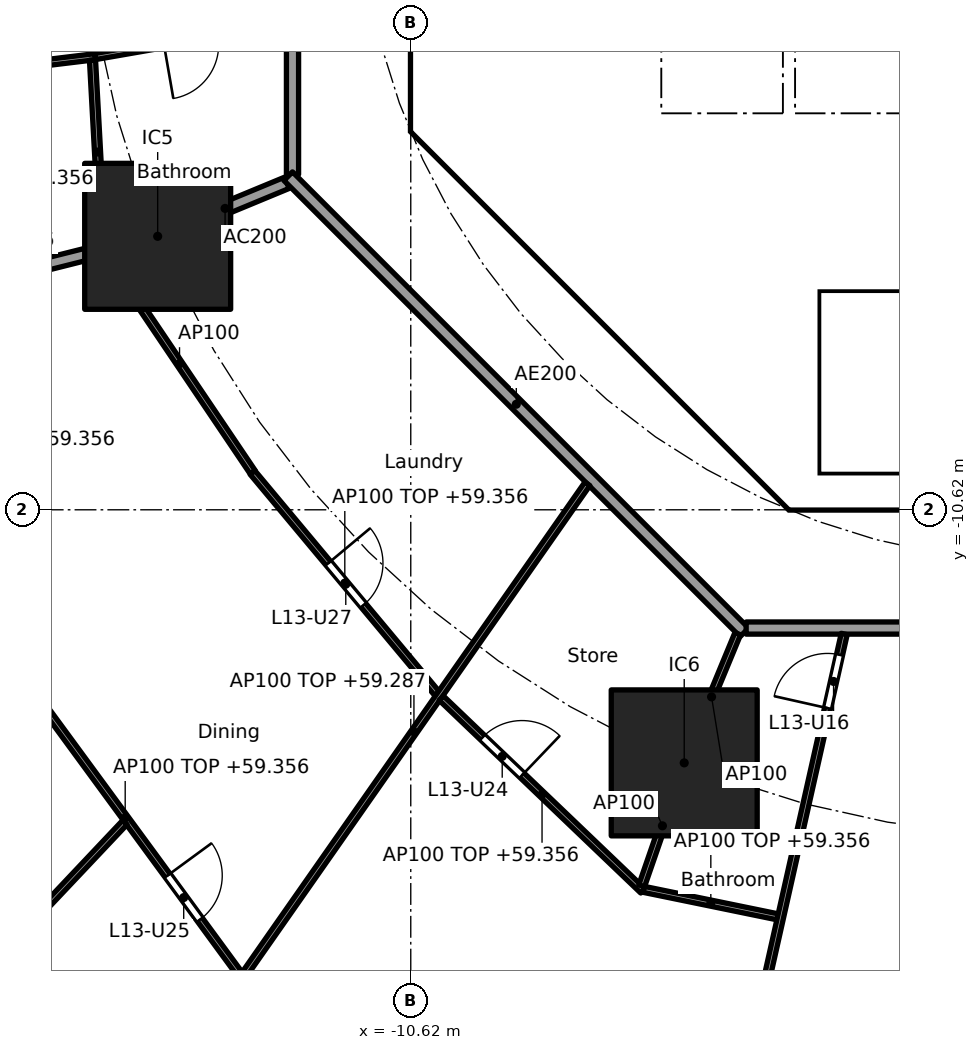
"""IFC4 building model, lengths in metres.
Left out: names, types, materials, properties, quantities, classifications, styles, units other than length and angle.
Written with IfcOpenShell. Run it as: python <this file> out.ifc"""

import sys

from ifc_helpers import new_model, si_unit, direction, frame, frame_2d, origin, origin_2d, place, context, subcontext, project, spatial, polyline, rectangle, outline, extrude, element, fill, save


model = new_model("IFC4")
c1 = context("Model", 3, precision=1e-05, world=origin(), true_north=direction((0.0, 1.0)))
c2 = subcontext(c1, "Body", "Model", "MODEL_VIEW")
j1 = project(units=[si_unit("LENGTHUNIT", "METRE"), si_unit("PLANEANGLEUNIT", "RADIAN")], contexts=[c1])
p1 = place(None, origin())
s1 = spatial("IfcSite", under=j1, at=p1, CompositionType="ELEMENT")
p2 = place(p1, origin())
s2 = spatial("IfcBuilding", under=s1, at=p2, CompositionType="ELEMENT")
p3 = place(p2, frame((0.0, 0.0, 56.6)))
s3 = spatial("IfcBuildingStorey", under=s2, at=p3, CompositionType="ELEMENT", Elevation=56.6)
for number, where, z_axis, x_axis in (
    (1, (-14.782, -6.123, 0.0), (0.0, 0.0, 1.0), (1.0, 0.0, 0.0)),
    (2, (-6.123, -14.782, 0.0), (0.0, 0.0, 1.0), (1.0, 0.0, 0.0)),
):
    element("IfcColumn", number, at=place(p3, frame(where, z_axis=z_axis, x_axis=x_axis)), inside=s3, PredefinedType="COLUMN", context=c2, shape_type="SweptSolid", body=[
        extrude(rectangle(XDim=2.4, YDim=2.4, at=origin_2d()), origin(), (0.0, 0.0, 1.0), 3.7),
    ])
p4 = place(p3, frame((-10.325, 3.801, 0.0), z_axis=(0.0, 0.0, 1.0), x_axis=(0.0, -1.0, 0.0)))
e3 = element("IfcWall", 3, at=p4, inside=s3, PredefinedType="SHEAR", context=c2, shape_type="SweptSolid", body=[
    extrude(rectangle(XDim=7.602, YDim=0.6, at=frame_2d((3.801, 0.0))), origin(), (0.0, 0.0, 1.0), 3.44),
])
p5 = place(p4, frame((0.651, 0.0, 0.0)))
e4 = element("IfcOpeningElement", 4, at=p5, cuts=e3, PredefinedType="OPENING", context=c2, shape_type="SweptSolid", body=[
    extrude(rectangle(XDim=1.5, YDim=2.1, at=frame_2d((0.75, 1.05))), frame((0.0, 0.31, 0.0), z_axis=(0.0, -1.0, 0.0), x_axis=(1.0, 0.0, 0.0)), (0.0, 0.0, 1.0), 0.62),
])
p6 = place(p4, frame((5.451, 0.0, 0.0)))
e5 = element("IfcOpeningElement", 5, at=p6, cuts=e3, PredefinedType="OPENING", context=c2, shape_type="SweptSolid", body=[
    extrude(rectangle(XDim=1.5, YDim=2.1, at=frame_2d((0.75, 1.05))), frame((0.0, 0.31, 0.0), z_axis=(0.0, -1.0, 0.0), x_axis=(1.0, 0.0, 0.0)), (0.0, 0.0, 1.0), 0.62),
])
p7 = place(p3, frame((-9.988, -4.613, 0.0), z_axis=(0.0, 0.0, 1.0), x_axis=(0.707106781187, -0.707106781187, 0.0)))
e6 = element("IfcWall", 6, at=p7, inside=s3, PredefinedType="SHEAR", context=c2, shape_type="SweptSolid", body=[
    extrude(rectangle(XDim=7.602, YDim=0.6, at=frame_2d((3.801, 0.0))), origin(), (0.0, 0.0, 1.0), 3.44),
])
p8 = place(p7, frame((6.151, 0.0, 0.0)))
e7 = element("IfcOpeningElement", 7, at=p8, cuts=e6, PredefinedType="OPENING", context=c2, shape_type="SweptSolid", body=[
    extrude(rectangle(XDim=1.1, YDim=2.1, at=frame_2d((0.55, 1.05))), frame((0.0, 0.31, 0.0), z_axis=(0.0, -1.0, 0.0), x_axis=(1.0, 0.0, 0.0)), (0.0, 0.0, 1.0), 0.62),
])
p9 = place(p3, frame((-7.4, -6.627, 0.0), z_axis=(0.0, 0.0, 1.0), x_axis=(0.0, 1.0, 0.0)))
e8 = element("IfcWall", 8, at=p9, inside=s3, PredefinedType="PARTITIONING", context=c2, shape_type="SweptSolid", body=[
    extrude(rectangle(XDim=2.527, YDim=0.15, at=frame_2d((1.263, 0.0))), origin(), (0.0, 0.0, 1.0), 3.44),
])
p10 = place(p9, frame((0.776, 0.0, 0.0)))
e9 = element("IfcOpeningElement", 9, at=p10, cuts=e8, PredefinedType="OPENING", context=c2, shape_type="SweptSolid", body=[
    extrude(rectangle(XDim=0.9, YDim=2.1, at=frame_2d((0.45, 1.05))), frame((0.0, 0.085, 0.0), z_axis=(0.0, -1.0, 0.0), x_axis=(1.0, 0.0, 0.0)), (0.0, 0.0, 1.0), 0.17),
])
p11 = place(p3, frame((-4.0, -6.5, 0.0), z_axis=(0.0, 0.0, 1.0), x_axis=(0.0, 1.0, 0.0)))
e10 = element("IfcWall", 10, at=p11, inside=s3, PredefinedType="SOLIDWALL", context=c2, shape_type="SweptSolid", body=[
    extrude(rectangle(XDim=2.2, YDim=0.2, at=frame_2d((1.1, 0.0))), origin(), (0.0, 0.0, 1.0), 3.44),
])
p12 = place(p11, frame((0.65, 0.0, 0.0)))
e11 = element("IfcOpeningElement", 11, at=p12, cuts=e10, PredefinedType="OPENING", context=c2, shape_type="SweptSolid", body=[
    extrude(rectangle(XDim=0.9, YDim=2.1, at=frame_2d((0.45, 1.05))), frame((0.0, 0.11, 0.0), z_axis=(0.0, -1.0, 0.0), x_axis=(1.0, 0.0, 0.0)), (0.0, 0.0, 1.0), 0.22),
])
p13 = place(p3, origin())
e12 = element("IfcWall", 12, at=p13, inside=s3, PredefinedType="SHEAR", context=c2, shape_type="SweptSolid", body=[
    extrude(outline(polyline([(-10.625, -3.801), (-10.025, -3.801), (-10.025, -4.152), (-9.776, -4.401), (-10.2, -4.825), (-10.625, -4.401), (-10.625, -3.801)])), origin(), (0.0, 0.0, 1.0), 3.44),
])
p14 = place(p3, origin())
e13 = element("IfcWall", 13, at=p14, inside=s3, PredefinedType="SHEAR", context=c2, shape_type="SweptSolid", body=[
    extrude(outline(polyline([(-4.152, -10.025), (4.152, -10.025), (4.401, -9.776), (4.825, -10.2), (4.401, -10.625), (-4.401, -10.625), (-4.825, -10.2), (-4.401, -9.776), (-4.152, -10.025)])), origin(), (0.0, 0.0, 1.0), 3.44),
])
p15 = place(p3, frame((-10.025, -4.0, 0.0), z_axis=(0.0, 0.0, 1.0), x_axis=(1.0, 0.0, 0.0)))
e14 = element("IfcWall", 14, at=p15, inside=s3, PredefinedType="PARTITIONING", context=c2, shape_type="SweptSolid", body=[
    extrude(rectangle(XDim=3.325, YDim=0.2, at=frame_2d((1.662, 0.0))), origin(), (0.0, 0.0, 1.0), 3.44),
])
p16 = place(p3, origin())
e15 = element("IfcWall", 15, at=p16, inside=s3, PredefinedType="SOLIDWALL", context=c2, shape_type="SweptSolid", body=[
    extrude(outline(polyline([(-6.7, -2.1), (-6.5, -2.1), (-6.5, -4.1), (-4.5, -4.1), (-4.5, -2.1), (-4.3, -2.1), (-4.3, -4.1), (-2.3, -4.1), (-2.3, -2.1), (-2.1, -2.1), (-2.1, -4.1), (-0.1, -4.1), (-0.1, -2.1), (0.1, -2.1), (0.1, -4.1), (2.1, -4.1), (2.1, -2.1), (2.3, -2.1), (2.3, -4.1), (4.3, -4.1), (4.3, -2.1), (4.5, -2.1), (4.5, -4.1), (6.5, -4.1), (6.5, -2.1), (6.7, -2.1), (6.7, -4.3), (-6.7, -4.3), (-6.7, -2.1)])), origin(), (0.0, 0.0, 1.0), 3.44),
])
p17 = place(p3, origin())
e16 = element("IfcWall", 16, at=p17, inside=s3, PredefinedType="SOLIDWALL", context=c2, shape_type="SweptSolid", body=[
    extrude(outline(polyline([(-3.9, -10.025), (-4.1, -10.025), (-4.1, -7.025), (-3.9, -7.025), (-3.9, -10.025)])), origin(), (0.0, 0.0, 1.0), 3.44),
])
p18 = place(p3, origin())
e17 = element("IfcWall", 17, at=p18, inside=s3, PredefinedType="SOLIDWALL", context=c2, shape_type="SweptSolid", body=[
    extrude(outline(polyline([(4.1, -7.025), (-4.1, -7.025), (-4.1, -6.5), (4.1, -6.5), (4.1, -7.025)])), origin(), (0.0, 0.0, 1.0), 3.44),
])
p19 = place(p3, frame((-12.657, -5.243, 0.0), z_axis=(0.0, 0.0, 1.0), x_axis=(-0.923885664896, -0.382668627144, 0.0)))
e18 = element("IfcWall", 18, at=p19, inside=s3, PredefinedType="PARTITIONING", context=c2, shape_type="SweptSolid", body=[
    extrude(rectangle(XDim=2.2, YDim=0.2, at=frame_2d((1.1, 0.0))), origin(), (0.0, 0.0, 1.0), 3.44),
])
p20 = place(p3, frame((-14.831, -6.135, 0.0), z_axis=(0.0, 0.0, 1.0), x_axis=(-0.969884949569, -0.243563512454, 0.0)))
e19 = element("IfcWall", 19, at=p20, inside=s3, PredefinedType="PARTITIONING", context=c2, shape_type="SweptSolid", body=[
    extrude(rectangle(XDim=8.829, YDim=0.2, at=frame_2d((4.415, 0.0))), origin(), (0.0, 0.0, 1.0), 2.756),
])
p21 = place(p3, frame((-12.565, 5.304, 0.0), z_axis=(0.0, 0.0, 1.0), x_axis=(0.0, -1.0, 0.0)))
e20 = element("IfcWall", 20, at=p21, inside=s3, PredefinedType="PARTITIONING", context=c2, shape_type="SweptSolid", body=[
    extrude(rectangle(XDim=10.409, YDim=0.2, at=frame_2d((5.205, 0.0))), origin(), (0.0, 0.0, 1.0), 3.44),
])
p22 = place(p21, frame((6.106, 0.0, 0.0)))
e21 = element("IfcOpeningElement", 21, at=p22, cuts=e20, PredefinedType="OPENING", context=c2, shape_type="SweptSolid", body=[
    extrude(rectangle(XDim=1.0, YDim=2.1, at=frame_2d((0.5, 1.05))), frame((0.0, 0.11, 0.0), z_axis=(0.0, -1.0, 0.0), x_axis=(1.0, 0.0, 0.0)), (0.0, 0.0, 1.0), 0.22),
])
p23 = place(p3, frame((-12.635, -5.134, 0.0), z_axis=(0.0, 0.0, 1.0), x_axis=(0.707106781187, -0.707106781187, 0.0)))
e22 = element("IfcWall", 22, at=p23, inside=s3, PredefinedType="PARTITIONING", context=c2, shape_type="SweptSolid", body=[
    extrude(rectangle(XDim=10.609, YDim=0.2, at=frame_2d((5.305, 0.0))), origin(), (0.0, 0.0, 1.0), 3.44),
])
p24 = place(p3, frame((-5.104, -12.565, 0.0), z_axis=(0.0, 0.0, 1.0), x_axis=(1.0, 0.0, 0.0)))
e23 = element("IfcWall", 23, at=p24, inside=s3, PredefinedType="PARTITIONING", context=c2, shape_type="SweptSolid", body=[
    extrude(rectangle(XDim=10.409, YDim=0.2, at=frame_2d((5.205, 0.0))), origin(), (0.0, 0.0, 1.0), 3.44),
])
p25 = place(p24, frame((2.87, 0.0, 0.0)))
e24 = element("IfcOpeningElement", 24, at=p25, cuts=e23, PredefinedType="OPENING", context=c2, shape_type="SweptSolid", body=[
    extrude(rectangle(XDim=1.0, YDim=2.1, at=frame_2d((0.5, 1.05))), frame((0.0, 0.11, 0.0), z_axis=(0.0, -1.0, 0.0), x_axis=(1.0, 0.0, 0.0)), (0.0, 0.0, 1.0), 0.22),
])
p26 = place(p3, frame((-12.663, -2.619, 0.0), z_axis=(0.0, 0.0, 1.0), x_axis=(-0.985220176102, -0.171292745325, 0.0)))
e25 = element("IfcWall", 25, at=p26, inside=s3, PredefinedType="PARTITIONING", context=c2, shape_type="SweptSolid", body=[
    extrude(rectangle(XDim=3.191, YDim=0.1, at=frame_2d((1.596, 0.0))), origin(), (0.0, 0.0, 1.0), 2.687),
])
p27 = place(p26, frame((1.146, 0.0, 0.0)))
e26 = element("IfcOpeningElement", 26, at=p27, cuts=e25, PredefinedType="OPENING", context=c2, shape_type="SweptSolid", body=[
    extrude(rectangle(XDim=0.9, YDim=2.1, at=frame_2d((0.45, 1.05))), frame((0.0, 0.06, 0.0), z_axis=(0.0, -1.0, 0.0), x_axis=(1.0, 0.0, 0.0)), (0.0, 0.0, 1.0), 0.12),
])
p28 = place(p3, frame((-15.807, -3.168, 0.0), z_axis=(0.0, 0.0, 1.0), x_axis=(-0.992741666002, -0.120266306938, 0.0)))
e27 = element("IfcWall", 27, at=p28, inside=s3, PredefinedType="PARTITIONING", context=c2, shape_type="SweptSolid", body=[
    extrude(rectangle(XDim=4.371, YDim=0.1, at=frame_2d((2.185, 0.0))), origin(), (0.0, 0.0, 1.0), 3.44),
])
p29 = place(p28, frame((1.76, 0.0, 0.0)))
e28 = element("IfcOpeningElement", 28, at=p29, cuts=e27, PredefinedType="OPENING", context=c2, shape_type="SweptSolid", body=[
    extrude(rectangle(XDim=0.9, YDim=2.1, at=frame_2d((0.45, 1.05))), frame((0.0, 0.06, 0.0), z_axis=(0.0, -1.0, 0.0), x_axis=(1.0, 0.0, 0.0)), (0.0, 0.0, 1.0), 0.12),
])
p30 = place(p3, frame((-15.854, -3.225, 0.0), z_axis=(0.0, 0.0, 1.0), x_axis=(0.054644199943, -0.998505889523, 0.0)))
e29 = element("IfcWall", 29, at=p30, inside=s3, PredefinedType="PARTITIONING", context=c2, shape_type="SweptSolid", body=[
    extrude(rectangle(XDim=3.029, YDim=0.1, at=frame_2d((1.515, 0.0))), origin(), (0.0, 0.0, 1.0), 2.756),
])
p31 = place(p3, frame((-15.627, -6.432, 0.0), z_axis=(0.0, 0.0, 1.0), x_axis=(0.559112679527, -0.829091678641, 0.0)))
e30 = element("IfcWall", 30, at=p31, inside=s3, PredefinedType="PARTITIONING", context=c2, shape_type="SweptSolid", body=[
    extrude(rectangle(XDim=4.308, YDim=0.1, at=frame_2d((2.154, 0.0))), origin(), (0.0, 0.0, 1.0), 3.44),
])
p32 = place(p3, frame((-13.222, -10.007, 0.0), z_axis=(0.0, 0.0, 1.0), x_axis=(0.640807748916, -0.767701393075, 0.0)))
e31 = element("IfcWall", 31, at=p32, inside=s3, PredefinedType="PARTITIONING", context=c2, shape_type="SweptSolid", body=[
    extrude(rectangle(XDim=4.737, YDim=0.1, at=frame_2d((2.368, 0.0))), origin(), (0.0, 0.0, 1.0), 2.756),
])
p33 = place(p32, frame((1.943, 0.0, 0.0)))
e32 = element("IfcOpeningElement", 32, at=p33, cuts=e31, PredefinedType="OPENING", context=c2, shape_type="SweptSolid", body=[
    extrude(rectangle(XDim=0.9, YDim=2.1, at=frame_2d((0.45, 1.05))), frame((0.0, 0.06, 0.0), z_axis=(0.0, -1.0, 0.0), x_axis=(1.0, 0.0, 0.0)), (0.0, 0.0, 1.0), 0.12),
])
p34 = place(p3, frame((-17.211, -13.1, 0.0), z_axis=(0.0, 0.0, 1.0), x_axis=(0.591206785834, -0.806520016109, 0.0)))
e33 = element("IfcWall", 33, at=p34, inside=s3, PredefinedType="PARTITIONING", context=c2, shape_type="SweptSolid", body=[
    extrude(rectangle(XDim=6.41, YDim=0.1, at=frame_2d((3.205, 0.0))), origin(), (0.0, 0.0, 1.0), 2.756),
])
p35 = place(p34, frame((4.383, 0.0, 0.0)))
e34 = element("IfcOpeningElement", 34, at=p35, cuts=e33, PredefinedType="OPENING", context=c2, shape_type="SweptSolid", body=[
    extrude(rectangle(XDim=0.9, YDim=2.1, at=frame_2d((0.45, 1.05))), frame((0.0, 0.06, 0.0), z_axis=(0.0, -1.0, 0.0), x_axis=(1.0, 0.0, 0.0)), (0.0, 0.0, 1.0), 0.12),
])
p36 = place(p3, frame((-15.321, -15.761, 0.0), z_axis=(0.0, 0.0, 1.0), x_axis=(-0.686519245775, -0.727111631856, 0.0)))
e35 = element("IfcWall", 35, at=p36, inside=s3, PredefinedType="PARTITIONING", context=c2, shape_type="SweptSolid", body=[
    extrude(rectangle(XDim=5.912, YDim=0.1, at=frame_2d((2.956, 0.0))), origin(), (0.0, 0.0, 1.0), 2.837),
])
p37 = place(p36, frame((2.506, 0.0, 0.0)))
e36 = element("IfcOpeningElement", 36, at=p37, cuts=e35, PredefinedType="OPENING", context=c2, shape_type="SweptSolid", body=[
    extrude(rectangle(XDim=0.9, YDim=2.1, at=frame_2d((0.45, 1.05))), frame((0.0, 0.06, 0.0), z_axis=(0.0, -1.0, 0.0), x_axis=(1.0, 0.0, 0.0)), (0.0, 0.0, 1.0), 0.12),
])
p38 = place(p3, frame((-7.715, -10.193, 0.0), z_axis=(0.0, 0.0, 1.0), x_axis=(-0.573126502256, -0.819466907454, 0.0)))
e37 = element("IfcWall", 37, at=p38, inside=s3, PredefinedType="PARTITIONING", context=c2, shape_type="SweptSolid", body=[
    extrude(rectangle(XDim=9.954, YDim=0.1, at=frame_2d((4.977, 0.0))), origin(), (0.0, 0.0, 1.0), 2.687),
])
p39 = place(p3, frame((-10.119, -13.716, 0.0), z_axis=(0.0, 0.0, 1.0), x_axis=(0.722763212502, -0.69109575216, 0.0)))
e38 = element("IfcWall", 38, at=p39, inside=s3, PredefinedType="PARTITIONING", context=c2, shape_type="SweptSolid", body=[
    extrude(rectangle(XDim=4.587, YDim=0.1, at=frame_2d((2.293, 0.0))), origin(), (0.0, 0.0, 1.0), 2.756),
])
p40 = place(p39, frame((0.938, 0.0, 0.0)))
e39 = element("IfcOpeningElement", 39, at=p40, cuts=e38, PredefinedType="OPENING", context=c2, shape_type="SweptSolid", body=[
    extrude(rectangle(XDim=0.9, YDim=2.1, at=frame_2d((0.45, 1.05))), frame((0.0, 0.06, 0.0), z_axis=(0.0, -1.0, 0.0), x_axis=(1.0, 0.0, 0.0)), (0.0, 0.0, 1.0), 0.12),
])
p41 = place(p3, frame((-5.243, -12.657, 0.0), z_axis=(0.0, 0.0, 1.0), x_axis=(-0.382719158442, -0.923864733477, 0.0)))
e40 = element("IfcWall", 40, at=p41, inside=s3, PredefinedType="PARTITIONING", context=c2, shape_type="SweptSolid", body=[
    extrude(rectangle(XDim=2.25, YDim=0.1, at=frame_2d((1.125, 0.0))), origin(), (0.0, 0.0, 1.0), 3.44),
])
p42 = place(p3, frame((-6.139, -14.83, 0.0), z_axis=(0.0, 0.0, 1.0), x_axis=(-0.327246993321, -0.944938836837, 0.0)))
e41 = element("IfcWall", 41, at=p42, inside=s3, PredefinedType="PARTITIONING", context=c2, shape_type="SweptSolid", body=[
    extrude(rectangle(XDim=2.09, YDim=0.1, at=frame_2d((1.045, 0.0))), origin(), (0.0, 0.0, 1.0), 3.44),
])
p43 = place(p3, frame((-6.791, -16.862, 0.0), z_axis=(0.0, 0.0, 1.0), x_axis=(0.979581941859, -0.201045316246, 0.0)))
e42 = element("IfcWall", 42, at=p43, inside=s3, PredefinedType="PARTITIONING", context=c2, shape_type="SweptSolid", body=[
    extrude(rectangle(XDim=2.256, YDim=0.1, at=frame_2d((1.128, 0.0))), origin(), (0.0, 0.0, 1.0), 2.756),
])
p44 = place(p3, frame((-3.492, -12.662, 0.0), z_axis=(0.0, 0.0, 1.0), x_axis=(-0.219268088006, -0.975664648115, 0.0)))
e43 = element("IfcWall", 43, at=p44, inside=s3, PredefinedType="PARTITIONING", context=c2, shape_type="SweptSolid", body=[
    extrude(rectangle(XDim=18.23, YDim=0.1, at=frame_2d((9.115, 0.0))), origin(), (0.0, 0.0, 1.0), 2.687),
])
p45 = place(p44, frame((0.35, 0.0, 0.0)))
e44 = element("IfcOpeningElement", 44, at=p45, cuts=e43, PredefinedType="OPENING", context=c2, shape_type="SweptSolid", body=[
    extrude(rectangle(XDim=0.9, YDim=2.1, at=frame_2d((0.45, 1.05))), frame((0.0, 0.06, 0.0), z_axis=(0.0, -1.0, 0.0), x_axis=(1.0, 0.0, 0.0)), (0.0, 0.0, 1.0), 0.12),
])
p46 = place(p44, frame((7.497, 0.0, 0.0)))
e45 = element("IfcOpeningElement", 45, at=p46, cuts=e43, PredefinedType="OPENING", context=c2, shape_type="SweptSolid", body=[
    extrude(rectangle(XDim=0.9, YDim=2.1, at=frame_2d((0.45, 1.05))), frame((0.0, 0.06, 0.0), z_axis=(0.0, -1.0, 0.0), x_axis=(1.0, 0.0, 0.0)), (0.0, 0.0, 1.0), 0.12),
])
p47 = place(p44, frame((14.223, 0.0, 0.0)))
e46 = element("IfcOpeningElement", 46, at=p47, cuts=e43, PredefinedType="OPENING", context=c2, shape_type="SweptSolid", body=[
    extrude(rectangle(XDim=0.9, YDim=2.1, at=frame_2d((0.45, 1.05))), frame((0.0, 0.06, 0.0), z_axis=(0.0, -1.0, 0.0), x_axis=(1.0, 0.0, 0.0)), (0.0, 0.0, 1.0), 0.12),
])
p48 = place(p10, origin())
e47 = element("IfcDoor", 47, at=p48, inside=s3, OperationType="SINGLE_SWING_RIGHT", PredefinedType="DOOR", context=c2, shape_type="SweptSolid", body=[
    extrude(rectangle(XDim=0.9, YDim=2.1, at=frame_2d((0.45, 1.05))), frame((0.0, 0.025, 0.0), z_axis=(0.0, -1.0, 0.0), x_axis=(1.0, 0.0, 0.0)), (0.0, 0.0, 1.0), 0.05),
])
fill(e9, e47)
p49 = place(p12, frame((0.9, 0.0, 0.0), x_axis=(-1.0, 0.0, 0.0)))
e48 = element("IfcDoor", 48, at=p49, inside=s3, OperationType="SINGLE_SWING_RIGHT", PredefinedType="DOOR", context=c2, shape_type="SweptSolid", body=[
    extrude(rectangle(XDim=0.9, YDim=2.1, at=frame_2d((0.45, 1.05))), frame((0.0, 0.025, 0.0), z_axis=(0.0, -1.0, 0.0), x_axis=(1.0, 0.0, 0.0)), (0.0, 0.0, 1.0), 0.05),
])
fill(e11, e48)
p50 = place(p6, origin())
e49 = element("IfcDoor", 49, at=p50, inside=s3, OperationType="DOUBLE_DOOR_SINGLE_SWING", PredefinedType="DOOR", context=c2, shape_type="SweptSolid", body=[
    extrude(rectangle(XDim=1.5, YDim=2.1, at=frame_2d((0.75, 1.05))), frame((0.0, 0.025, 0.0), z_axis=(0.0, -1.0, 0.0), x_axis=(1.0, 0.0, 0.0)), (0.0, 0.0, 1.0), 0.05),
])
fill(e5, e49)
p51 = place(p8, origin())
e50 = element("IfcDoor", 50, at=p51, inside=s3, OperationType="SINGLE_SWING_LEFT", PredefinedType="DOOR", context=c2, shape_type="SweptSolid", body=[
    extrude(rectangle(XDim=1.1, YDim=2.1, at=frame_2d((0.55, 1.05))), frame((0.0, 0.025, 0.0), z_axis=(0.0, -1.0, 0.0), x_axis=(1.0, 0.0, 0.0)), (0.0, 0.0, 1.0), 0.05),
])
fill(e7, e50)
p52 = place(p45, frame((0.9, 0.0, 0.0), x_axis=(-1.0, 0.0, 0.0)))
e51 = element("IfcDoor", 51, at=p52, inside=s3, OperationType="SINGLE_SWING_LEFT", PredefinedType="DOOR", context=c2, shape_type="SweptSolid", body=[
    extrude(rectangle(XDim=0.9, YDim=2.1, at=frame_2d((0.45, 1.05))), frame((0.0, 0.025, 0.0), z_axis=(0.0, -1.0, 0.0), x_axis=(1.0, 0.0, 0.0)), (0.0, 0.0, 1.0), 0.05),
])
fill(e44, e51)
p53 = place(p40, origin())
e52 = element("IfcDoor", 52, at=p53, inside=s3, OperationType="SINGLE_SWING_RIGHT", PredefinedType="DOOR", context=c2, shape_type="SweptSolid", body=[
    extrude(rectangle(XDim=0.9, YDim=2.1, at=frame_2d((0.45, 1.05))), frame((0.0, 0.025, 0.0), z_axis=(0.0, -1.0, 0.0), x_axis=(1.0, 0.0, 0.0)), (0.0, 0.0, 1.0), 0.05),
])
fill(e39, e52)
p54 = place(p35, origin())
e53 = element("IfcDoor", 53, at=p54, inside=s3, OperationType="SINGLE_SWING_LEFT", PredefinedType="DOOR", context=c2, shape_type="SweptSolid", body=[
    extrude(rectangle(XDim=0.9, YDim=2.1, at=frame_2d((0.45, 1.05))), frame((0.0, 0.025, 0.0), z_axis=(0.0, -1.0, 0.0), x_axis=(1.0, 0.0, 0.0)), (0.0, 0.0, 1.0), 0.05),
])
fill(e34, e53)
p55 = place(p33, origin())
e54 = element("IfcDoor", 54, at=p55, inside=s3, OperationType="SINGLE_SWING_LEFT", PredefinedType="DOOR", context=c2, shape_type="SweptSolid", body=[
    extrude(rectangle(XDim=0.9, YDim=2.1, at=frame_2d((0.45, 1.05))), frame((0.0, 0.025, 0.0), z_axis=(0.0, -1.0, 0.0), x_axis=(1.0, 0.0, 0.0)), (0.0, 0.0, 1.0), 0.05),
])
fill(e32, e54)
save(model, sys.argv[1])
